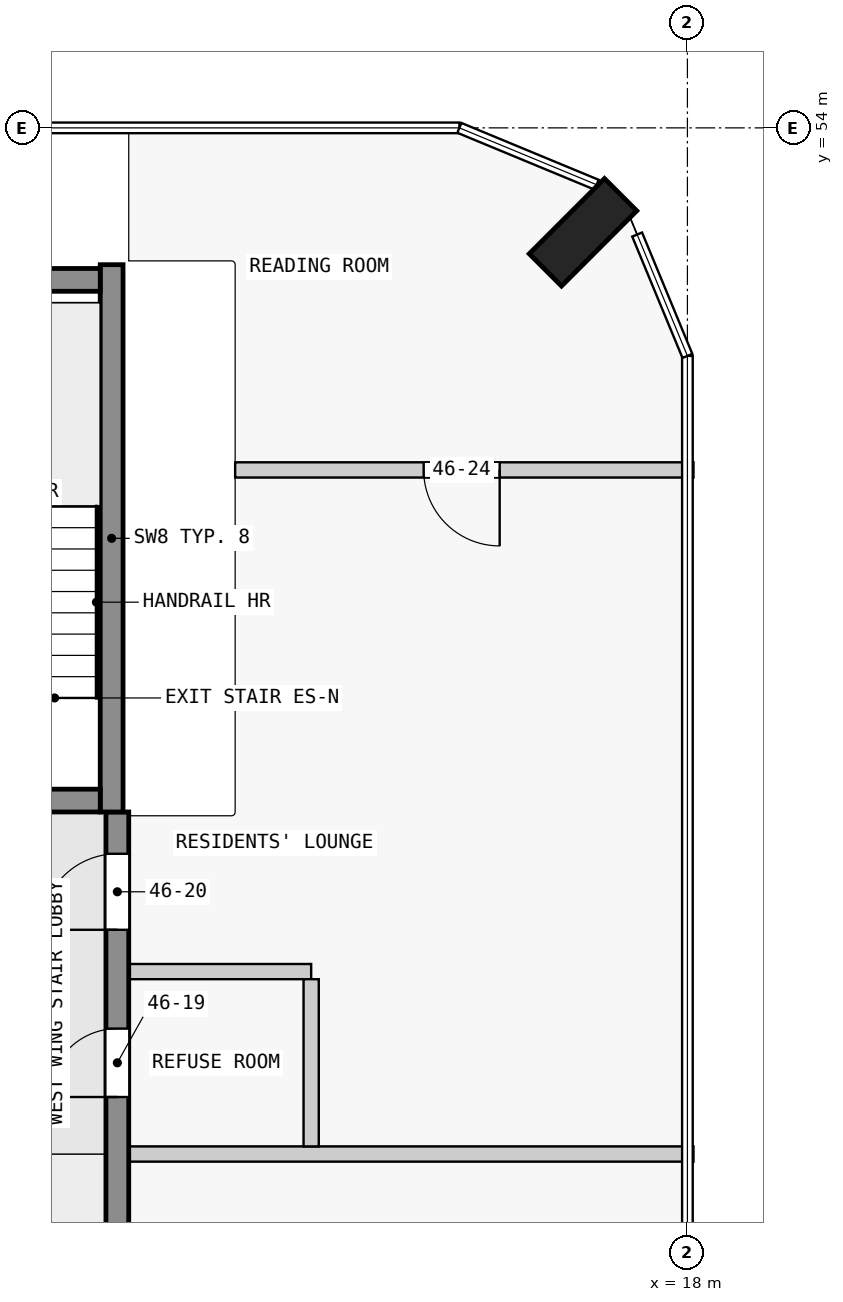
"""IFC4 building model, lengths in metres.
Left out: names, types, materials, properties, quantities, classifications, styles, units other than length and angle.
Written with IfcOpenShell. Run it as: python <this file> out.ifc"""

import sys

from ifc_helpers import new_model, si_unit, direction, frame, frame_2d, origin, origin_2d, place, context, subcontext, project, spatial, rectangle, extrude, element, fill, save


model = new_model("IFC4")
c1 = context("Model", 3, precision=1e-05, world=origin(), true_north=direction((0.0, 1.0)))
c2 = subcontext(c1, "Body", "Model", "MODEL_VIEW")
j1 = project(units=[si_unit("LENGTHUNIT", "METRE"), si_unit("PLANEANGLEUNIT", "RADIAN")], contexts=[c1])
p1 = place(None, origin())
s1 = spatial("IfcSite", under=j1, at=p1, CompositionType="ELEMENT")
p2 = place(p1, origin())
s2 = spatial("IfcBuilding", under=s1, at=p2, CompositionType="ELEMENT")
p3 = place(p2, frame((0.0, 0.0, 177.9)))
s3 = spatial("IfcBuildingStorey", under=s2, at=p3, CompositionType="ELEMENT", Elevation=177.9)
p4 = place(p3, frame((16.626, 52.626, 0.0), z_axis=(0.0, 0.0, 1.0), x_axis=(-0.707106781187, 0.707106781187, 0.0)))
e1 = element("IfcColumn", 1, at=p4, inside=s3, PredefinedType="COLUMN", context=c2, shape_type="SweptSolid", body=[
    extrude(rectangle(XDim=0.6, YDim=1.4, at=origin_2d()), origin(), (0.0, 0.0, 1.0), 3.5),
])
p5 = place(p3, frame((7.725, 45.15, 0.0), z_axis=(0.0, 0.0, 1.0), x_axis=(1.0, 0.0, 0.0)))
e2 = element("IfcWall", 2, at=p5, inside=s3, PredefinedType="SHEAR", context=c2, shape_type="SweptSolid", body=[
    extrude(rectangle(XDim=2.55, YDim=0.3, at=frame_2d((1.275, 0.0))), origin(), (0.0, 0.0, 1.0), 3.5),
])
p6 = place(p5, frame((0.725, 0.0, 0.0)))
e3 = element("IfcOpeningElement", 3, at=p6, cuts=e2, PredefinedType="OPENING", context=c2, shape_type="SweptSolid", body=[
    extrude(rectangle(XDim=1.1, YDim=2.1, at=frame_2d((0.55, 1.05))), frame((0.0, 0.16, 0.0), z_axis=(0.0, -1.0, 0.0), x_axis=(1.0, 0.0, 0.0)), (0.0, 0.0, 1.0), 0.32),
])
p7 = place(p3, frame((7.725, 52.0, 0.0), z_axis=(0.0, 0.0, 1.0), x_axis=(1.0, 0.0, 0.0)))
e4 = element("IfcWall", 4, at=p7, inside=s3, PredefinedType="SHEAR", context=c2, shape_type="SweptSolid", body=[
    extrude(rectangle(XDim=2.55, YDim=0.3, at=frame_2d((1.275, 0.0))), origin(), (0.0, 0.0, 1.0), 3.5),
])
p8 = place(p3, frame((10.425, 45.0, 0.0), z_axis=(0.0, 0.0, 1.0), x_axis=(0.0, 1.0, 0.0)))
e5 = element("IfcWall", 5, at=p8, inside=s3, PredefinedType="SHEAR", context=c2, shape_type="SweptSolid", body=[
    extrude(rectangle(XDim=7.2, YDim=0.3, at=frame_2d((3.6, 0.0))), origin(), (0.0, 0.0, 1.0), 3.5),
])
p9 = place(p3, frame((10.5, 18.0, 0.0), z_axis=(0.0, 0.0, 1.0), x_axis=(0.0, 1.0, 0.0)))
e6 = element("IfcWall", 6, at=p9, inside=s3, PredefinedType="SHEAR", context=c2, shape_type="SweptSolid", body=[
    extrude(rectangle(XDim=27.0, YDim=0.3, at=frame_2d((13.5, 0.0))), origin(), (0.0, 0.0, 1.0), 3.25),
])
p10 = place(p9, frame((1.75, 0.0, 0.0)))
e7 = element("IfcOpeningElement", 7, at=p10, cuts=e6, PredefinedType="OPENING", context=c2, shape_type="SweptSolid", body=[
    extrude(rectangle(XDim=1.0, YDim=2.1, at=frame_2d((0.5, 1.05))), frame((0.0, 0.16, 0.0), z_axis=(0.0, -1.0, 0.0), x_axis=(1.0, 0.0, 0.0)), (0.0, 0.0, 1.0), 0.32),
])
p11 = place(p9, frame((6.25, 0.0, 0.0)))
e8 = element("IfcOpeningElement", 8, at=p11, cuts=e6, PredefinedType="OPENING", context=c2, shape_type="SweptSolid", body=[
    extrude(rectangle(XDim=1.0, YDim=2.1, at=frame_2d((0.5, 1.05))), frame((0.0, 0.16, 0.0), z_axis=(0.0, -1.0, 0.0), x_axis=(1.0, 0.0, 0.0)), (0.0, 0.0, 1.0), 0.32),
])
p12 = place(p9, frame((10.75, 0.0, 0.0)))
e9 = element("IfcOpeningElement", 9, at=p12, cuts=e6, PredefinedType="OPENING", context=c2, shape_type="SweptSolid", body=[
    extrude(rectangle(XDim=1.0, YDim=2.1, at=frame_2d((0.5, 1.05))), frame((0.0, 0.16, 0.0), z_axis=(0.0, -1.0, 0.0), x_axis=(1.0, 0.0, 0.0)), (0.0, 0.0, 1.0), 0.32),
])
p13 = place(p9, frame((15.25, 0.0, 0.0)))
e10 = element("IfcOpeningElement", 10, at=p13, cuts=e6, PredefinedType="OPENING", context=c2, shape_type="SweptSolid", body=[
    extrude(rectangle(XDim=1.0, YDim=2.1, at=frame_2d((0.5, 1.05))), frame((0.0, 0.16, 0.0), z_axis=(0.0, -1.0, 0.0), x_axis=(1.0, 0.0, 0.0)), (0.0, 0.0, 1.0), 0.32),
])
p14 = place(p9, frame((19.75, 0.0, 0.0)))
e11 = element("IfcOpeningElement", 11, at=p14, cuts=e6, PredefinedType="OPENING", context=c2, shape_type="SweptSolid", body=[
    extrude(rectangle(XDim=1.0, YDim=2.1, at=frame_2d((0.5, 1.05))), frame((0.0, 0.16, 0.0), z_axis=(0.0, -1.0, 0.0), x_axis=(1.0, 0.0, 0.0)), (0.0, 0.0, 1.0), 0.32),
])
p15 = place(p9, frame((23.25, 0.0, 0.0)))
e12 = element("IfcOpeningElement", 12, at=p15, cuts=e6, PredefinedType="OPENING", context=c2, shape_type="SweptSolid", body=[
    extrude(rectangle(XDim=0.9, YDim=2.1, at=frame_2d((0.45, 1.05))), frame((0.0, 0.16, 0.0), z_axis=(0.0, -1.0, 0.0), x_axis=(1.0, 0.0, 0.0)), (0.0, 0.0, 1.0), 0.32),
])
p16 = place(p9, frame((25.45, 0.0, 0.0)))
e13 = element("IfcOpeningElement", 13, at=p16, cuts=e6, PredefinedType="OPENING", context=c2, shape_type="SweptSolid", body=[
    extrude(rectangle(XDim=1.0, YDim=2.1, at=frame_2d((0.5, 1.05))), frame((0.0, 0.16, 0.0), z_axis=(0.0, -1.0, 0.0), x_axis=(1.0, 0.0, 0.0)), (0.0, 0.0, 1.0), 0.32),
])
p17 = place(p3, frame((18.08, 40.5, 0.0), z_axis=(0.0, 0.0, 1.0), x_axis=(-1.0, 0.0, 0.0)))
e14 = element("IfcWall", 14, at=p17, inside=s3, PredefinedType="PARTITIONING", context=c2, shape_type="SweptSolid", body=[
    extrude(rectangle(XDim=7.43, YDim=0.2, at=frame_2d((3.715, 0.0))), origin(), (0.0, 0.0, 1.0), 3.25),
])
p18 = place(p3, frame((13.05, 42.9, 0.0), z_axis=(0.0, 0.0, 1.0), x_axis=(-1.0, 0.0, 0.0)))
e15 = element("IfcWall", 15, at=p18, inside=s3, PredefinedType="PARTITIONING", context=c2, shape_type="SweptSolid", body=[
    extrude(rectangle(XDim=2.4, YDim=0.2, at=frame_2d((1.2, 0.0))), origin(), (0.0, 0.0, 1.0), 3.25),
])
p19 = place(p3, frame((18.08, 49.5, 0.0), z_axis=(0.0, 0.0, 1.0), x_axis=(-1.0, 0.0, 0.0)))
e16 = element("IfcWall", 16, at=p19, inside=s3, PredefinedType="PARTITIONING", context=c2, shape_type="SweptSolid", body=[
    extrude(rectangle(XDim=6.03, YDim=0.2, at=frame_2d((3.015, 0.0))), origin(), (0.0, 0.0, 1.0), 3.25),
])
p20 = place(p19, frame((2.55, 0.0, 0.0)))
e17 = element("IfcOpeningElement", 17, at=p20, cuts=e16, PredefinedType="OPENING", context=c2, shape_type="SweptSolid", body=[
    extrude(rectangle(XDim=1.0, YDim=2.1, at=frame_2d((0.5, 1.05))), frame((0.0, 0.11, 0.0), z_axis=(0.0, -1.0, 0.0), x_axis=(1.0, 0.0, 0.0)), (0.0, 0.0, 1.0), 0.22),
])
p21 = place(p3, frame((13.05, 40.6, 0.0), z_axis=(0.0, 0.0, 1.0), x_axis=(0.0, 1.0, 0.0)))
e18 = element("IfcWall", 18, at=p21, inside=s3, PredefinedType="PARTITIONING", context=c2, shape_type="SweptSolid", body=[
    extrude(rectangle(XDim=2.2, YDim=0.2, at=frame_2d((1.1, 0.0))), origin(), (0.0, 0.0, 1.0), 3.25),
])
p22 = place(p15, origin())
e19 = element("IfcDoor", 19, at=p22, inside=s3, OperationType="SINGLE_SWING_RIGHT", PredefinedType="DOOR", context=c2, shape_type="SweptSolid", body=[
    extrude(rectangle(XDim=0.9, YDim=2.1, at=frame_2d((0.45, 1.05))), frame((0.0, 0.025, 0.0), z_axis=(0.0, -1.0, 0.0), x_axis=(1.0, 0.0, 0.0)), (0.0, 0.0, 1.0), 0.05),
])
fill(e12, e19)
p23 = place(p16, origin())
e20 = element("IfcDoor", 20, at=p23, inside=s3, OperationType="SINGLE_SWING_RIGHT", PredefinedType="DOOR", context=c2, shape_type="SweptSolid", body=[
    extrude(rectangle(XDim=1.0, YDim=2.1, at=frame_2d((0.5, 1.05))), frame((0.0, 0.025, 0.0), z_axis=(0.0, -1.0, 0.0), x_axis=(1.0, 0.0, 0.0)), (0.0, 0.0, 1.0), 0.05),
])
fill(e13, e20)
p24 = place(p20, origin())
e21 = element("IfcDoor", 21, at=p24, inside=s3, OperationType="SINGLE_SWING_RIGHT", PredefinedType="DOOR", context=c2, shape_type="SweptSolid", body=[
    extrude(rectangle(XDim=1.0, YDim=2.1, at=frame_2d((0.5, 1.05))), frame((0.0, 0.025, 0.0), z_axis=(0.0, -1.0, 0.0), x_axis=(1.0, 0.0, 0.0)), (0.0, 0.0, 1.0), 0.05),
])
fill(e17, e21)
save(model, sys.argv[1])
